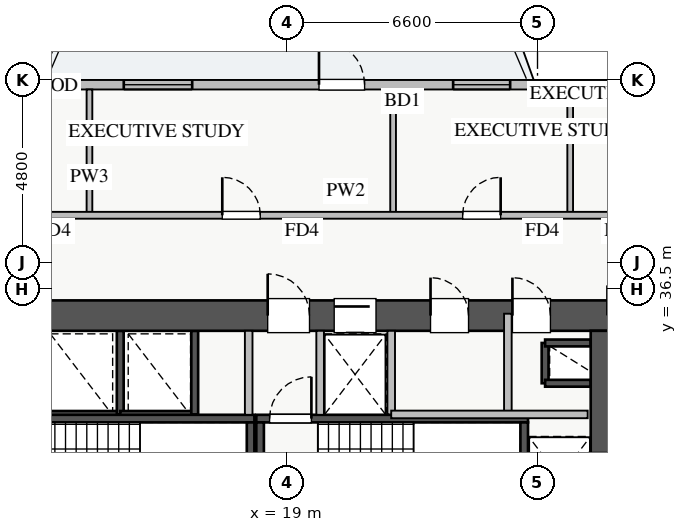
"""IFC4 building model, lengths in metres.
Left out: names, types, materials, properties, quantities, classifications, styles, units other than length and angle.
Written with IfcOpenShell. Run it as: python <this file> out.ifc"""

import sys

from ifc_helpers import new_model, si_unit, direction, frame, frame_2d, origin, place, context, subcontext, project, spatial, rectangle, extrude, source, transform, mapped, element, fill, save


model = new_model("IFC4")
c1 = context("Model", 3, precision=1e-05, world=origin(), true_north=direction((0.0, 1.0)))
c2 = subcontext(c1, "Body", "Model", "MODEL_VIEW")
j1 = project(units=[si_unit("LENGTHUNIT", "METRE"), si_unit("PLANEANGLEUNIT", "RADIAN")], contexts=[c1])
p1 = place(None, origin())
s1 = spatial("IfcSite", under=j1, at=p1, CompositionType="ELEMENT")
p2 = place(p1, origin())
s2 = spatial("IfcBuilding", under=s1, at=p2, CompositionType="ELEMENT")
p3 = place(p2, frame((0.0, 0.0, 66.5)))
s3 = spatial("IfcBuildingStorey", under=s2, at=p3, CompositionType="ELEMENT", Elevation=66.5)
p4 = place(p3, frame((12.68, 33.2, 0.0), z_axis=(0.0, 0.0, 1.0), x_axis=(1.0, 0.0, 0.0)))
e1 = element("IfcWall", 1, at=p4, inside=s3, PredefinedType="SHEAR", context=c2, shape_type="SweptSolid", body=[
    extrude(rectangle(XDim=1.94, YDim=0.18, at=frame_2d((0.97, 0.0))), origin(), (0.0, 0.0, 1.0), 3.07),
])
p5 = place(p3, frame((14.62, 33.2, 0.0), z_axis=(0.0, 0.0, 1.0), x_axis=(0.0, 1.0, 0.0)))
e2 = element("IfcWall", 2, at=p5, inside=s3, PredefinedType="SHEAR", context=c2, shape_type="SweptSolid", body=[
    extrude(rectangle(XDim=2.2, YDim=0.18, at=frame_2d((1.1, 0.0))), origin(), (0.0, 0.0, 1.0), 3.07),
])
p6 = place(p3, frame((25.8, 34.02, 0.0), z_axis=(0.0, 0.0, 1.0), x_axis=(0.0, 1.0, 0.0)))
e3 = element("IfcWall", 3, at=p6, inside=s3, PredefinedType="SHEAR", context=c2, shape_type="SweptSolid", body=[
    extrude(rectangle(XDim=1.06, YDim=0.18, at=frame_2d((0.53, 0.0))), origin(), (0.0, 0.0, 1.0), 3.07),
])
for number, where, z_axis, x_axis in (
    (4, (25.8, 35.08, 0.0), (0.0, 0.0, 1.0), (1.0, 0.0, 0.0)),
    (5, (25.8, 34.02, 0.0), (0.0, 0.0, 1.0), (1.0, 0.0, 0.0)),
):
    element("IfcWall", number, at=place(p3, frame(where, z_axis=z_axis, x_axis=x_axis)), inside=s3, PredefinedType="SHEAR", context=c2, shape_type="SweptSolid", body=[
        extrude(rectangle(XDim=1.2, YDim=0.18, at=frame_2d((0.6, 0.0))), origin(), (0.0, 0.0, 1.0), 3.07),
    ])
p7 = place(p3, frame((14.62, 33.2, 0.0), z_axis=(0.0, 0.0, 1.0), x_axis=(1.0, 0.0, 0.0)))
e6 = element("IfcWall", 6, at=p7, inside=s3, PredefinedType="SHEAR", context=c2, shape_type="SweptSolid", body=[
    extrude(rectangle(XDim=1.96, YDim=0.18, at=frame_2d((0.98, 0.0))), origin(), (0.0, 0.0, 1.0), 3.07),
])
p8 = place(p3, frame((16.58, 33.2, 0.0), z_axis=(0.0, 0.0, 1.0), x_axis=(0.0, 1.0, 0.0)))
e7 = element("IfcWall", 7, at=p8, inside=s3, PredefinedType="SHEAR", context=c2, shape_type="SweptSolid", body=[
    extrude(rectangle(XDim=2.2, YDim=0.18, at=frame_2d((1.1, 0.0))), origin(), (0.0, 0.0, 1.0), 3.07),
])
p9 = place(p3, frame((19.88, 33.2, 0.0), z_axis=(0.0, 0.0, 1.0), x_axis=(1.0, 0.0, 0.0)))
e8 = element("IfcWall", 8, at=p9, inside=s3, PredefinedType="SHEAR", context=c2, shape_type="SweptSolid", body=[
    extrude(rectangle(XDim=1.87, YDim=0.18, at=frame_2d((0.935, 0.0))), origin(), (0.0, 0.0, 1.0), 3.07),
])
p10 = place(p3, frame((11.0, 33.09, 0.0), z_axis=(0.0, 0.0, 1.0), x_axis=(1.0, 0.0, 0.0)))
e9 = element("IfcWall", 9, at=p10, inside=s3, PredefinedType="SHEAR", context=c2, shape_type="SweptSolid", body=[
    extrude(rectangle(XDim=7.15, YDim=0.2, at=frame_2d((3.575, 0.0))), origin(), (0.0, 0.0, 1.0), 3.25),
])
p11 = place(p10, frame((0.35, 0.0, 0.0)))
e10 = element("IfcOpeningElement", 10, at=p11, cuts=e9, PredefinedType="OPENING", context=c2, shape_type="SweptSolid", body=[
    extrude(rectangle(XDim=1.1, YDim=2.05, at=frame_2d((0.55, 1.025))), frame((0.0, 0.11, 0.0), z_axis=(0.0, -1.0, 0.0), x_axis=(1.0, 0.0, 0.0)), (0.0, 0.0, 1.0), 0.22),
])
p12 = place(p3, frame((18.05, 30.05, 0.0), z_axis=(0.0, 0.0, 1.0), x_axis=(0.0, 1.0, 0.0)))
e11 = element("IfcWall", 11, at=p12, inside=s3, PredefinedType="SHEAR", context=c2, shape_type="SweptSolid", body=[
    extrude(rectangle(XDim=2.94, YDim=0.2, at=frame_2d((1.47, 0.0))), origin(), (0.0, 0.0, 1.0), 3.25),
])
p13 = place(p3, frame((18.2, 33.09, 0.0), z_axis=(0.0, 0.0, 1.0), x_axis=(1.0, 0.0, 0.0)))
e12 = element("IfcWall", 12, at=p13, inside=s3, PredefinedType="SHEAR", context=c2, shape_type="SweptSolid", body=[
    extrude(rectangle(XDim=7.15, YDim=0.2, at=frame_2d((3.575, 0.0))), origin(), (0.0, 0.0, 1.0), 3.25),
])
p14 = place(p13, frame((0.35, 0.0, 0.0)))
e13 = element("IfcOpeningElement", 13, at=p14, cuts=e12, PredefinedType="OPENING", context=c2, shape_type="SweptSolid", body=[
    extrude(rectangle(XDim=1.1, YDim=2.05, at=frame_2d((0.55, 1.025))), frame((0.0, 0.11, 0.0), z_axis=(0.0, -1.0, 0.0), x_axis=(1.0, 0.0, 0.0)), (0.0, 0.0, 1.0), 0.22),
])
for number, where, z_axis, x_axis in (
    (14, (18.3, 30.05, 0.0), (0.0, 0.0, 1.0), (0.0, 1.0, 0.0)),
    (15, (25.25, 30.05, 0.0), (0.0, 0.0, 1.0), (0.0, 1.0, 0.0)),
):
    element("IfcWall", number, at=place(p3, frame(where, z_axis=z_axis, x_axis=x_axis)), inside=s3, PredefinedType="SHEAR", context=c2, shape_type="SweptSolid", body=[
        extrude(rectangle(XDim=2.94, YDim=0.2, at=frame_2d((1.47, 0.0))), origin(), (0.0, 0.0, 1.0), 3.25),
    ])
p15 = place(p3, frame((10.2, 35.8, 0.0), z_axis=(0.0, 0.0, 1.0), x_axis=(1.0, 0.0, 0.0)))
e16 = element("IfcWall", 16, at=p15, inside=s3, PredefinedType="SHEAR", context=c2, shape_type="SweptSolid", body=[
    extrude(rectangle(XDim=17.6, YDim=0.8, at=frame_2d((8.8, 0.0))), origin(), (0.0, 0.0, 1.0), 3.25),
])
p16 = place(p15, frame((1.15, 0.0, 0.0)))
e17 = element("IfcOpeningElement", 17, at=p16, cuts=e16, PredefinedType="OPENING", context=c2, shape_type="SweptSolid", body=[
    extrude(rectangle(XDim=1.1, YDim=2.05, at=frame_2d((0.55, 1.025))), frame((0.0, 0.41, 0.0), z_axis=(0.0, -1.0, 0.0), x_axis=(1.0, 0.0, 0.0)), (0.0, 0.0, 1.0), 0.82),
])
p17 = place(p15, frame((8.3, 0.0, 0.0)))
e18 = element("IfcOpeningElement", 18, at=p17, cuts=e16, PredefinedType="OPENING", context=c2, shape_type="SweptSolid", body=[
    extrude(rectangle(XDim=1.1, YDim=2.05, at=frame_2d((0.55, 1.025))), frame((0.0, 0.41, 0.0), z_axis=(0.0, -1.0, 0.0), x_axis=(1.0, 0.0, 0.0)), (0.0, 0.0, 1.0), 0.82),
])
p18 = place(p15, frame((10.05, 0.0, 0.0)))
e19 = element("IfcOpeningElement", 19, at=p18, cuts=e16, PredefinedType="OPENING", context=c2, shape_type="SweptSolid", body=[
    extrude(rectangle(XDim=1.1, YDim=2.05, at=frame_2d((0.55, 1.025))), frame((0.0, 0.41, 0.0), z_axis=(0.0, -1.0, 0.0), x_axis=(1.0, 0.0, 0.0)), (0.0, 0.0, 1.0), 0.82),
])
p19 = place(p15, frame((14.74, 0.0, 0.0)))
e20 = element("IfcOpeningElement", 20, at=p19, cuts=e16, PredefinedType="OPENING", context=c2, shape_type="SweptSolid", body=[
    extrude(rectangle(XDim=1.0, YDim=2.05, at=frame_2d((0.5, 1.025))), frame((0.0, 0.41, 0.0), z_axis=(0.0, -1.0, 0.0), x_axis=(1.0, 0.0, 0.0)), (0.0, 0.0, 1.0), 0.82),
])
p20 = place(p15, frame((12.585, 0.0, 0.0)))
e21 = element("IfcOpeningElement", 21, at=p20, cuts=e16, PredefinedType="OPENING", context=c2, shape_type="SweptSolid", body=[
    extrude(rectangle(XDim=1.0, YDim=2.05, at=frame_2d((0.5, 1.025))), frame((0.0, 0.41, 0.0), z_axis=(0.0, -1.0, 0.0), x_axis=(1.0, 0.0, 0.0)), (0.0, 0.0, 1.0), 0.82),
])
p21 = place(p3, frame((27.4, 29.8, 0.0), z_axis=(0.0, 0.0, 1.0), x_axis=(0.0, 1.0, 0.0)))
e22 = element("IfcWall", 22, at=p21, inside=s3, PredefinedType="SHEAR", context=c2, shape_type="SweptSolid", body=[
    extrude(rectangle(XDim=5.6, YDim=0.8, at=frame_2d((2.8, 0.0))), origin(), (0.0, 0.0, 1.0), 3.25),
])
p22 = place(p21, frame((1.1, 0.0, 0.0)))
e23 = element("IfcOpeningElement", 23, at=p22, cuts=e22, PredefinedType="OPENING", context=c2, shape_type="SweptSolid", body=[
    extrude(rectangle(XDim=1.3, YDim=2.05, at=frame_2d((0.65, 1.025))), frame((0.0, 0.41, 0.0), z_axis=(0.0, -1.0, 0.0), x_axis=(1.0, 0.0, 0.0)), (0.0, 0.0, 1.0), 0.82),
])
p23 = place(p3, frame((5.45, 41.875, 0.0), z_axis=(0.0, 0.0, 1.0), x_axis=(1.0, 0.0, 0.0)))
e24 = element("IfcWall", 24, at=p23, inside=s3, PredefinedType="STANDARD", context=c2, shape_type="SweptSolid", body=[
    extrude(rectangle(XDim=27.1, YDim=0.25, at=frame_2d((13.55, 0.0))), origin(), (0.0, 0.0, 1.0), 2.61),
])
p24 = place(p23, frame((14.4, 0.0, 0.0)))
e25 = element("IfcOpeningElement", 25, at=p24, cuts=e24, PredefinedType="OPENING", context=c2, shape_type="SweptSolid", body=[
    extrude(rectangle(XDim=1.2, YDim=2.1, at=frame_2d((0.6, 1.05))), frame((0.0, 0.135, 0.0), z_axis=(0.0, -1.0, 0.0), x_axis=(1.0, 0.0, 0.0)), (0.0, 0.0, 1.0), 0.27),
])
p25 = place(p23, frame((1.465, 0.0, 0.9)))
e26 = element("IfcOpeningElement", 26, at=p25, cuts=e24, PredefinedType="OPENING", context=c2, shape_type="SweptSolid", body=[
    extrude(rectangle(XDim=1.5, YDim=1.5, at=frame_2d((0.75, 0.75))), frame((0.0, 0.135, 0.0), z_axis=(0.0, -1.0, 0.0), x_axis=(1.0, 0.0, 0.0)), (0.0, 0.0, 1.0), 0.27),
])
p26 = place(p23, frame((9.263, 0.0, 0.9)))
e27 = element("IfcOpeningElement", 27, at=p26, cuts=e24, PredefinedType="OPENING", context=c2, shape_type="SweptSolid", body=[
    extrude(rectangle(XDim=1.8, YDim=1.45, at=frame_2d((0.9, 0.725))), frame((0.0, 0.135, 0.0), z_axis=(0.0, -1.0, 0.0), x_axis=(1.0, 0.0, 0.0)), (0.0, 0.0, 1.0), 0.27),
])
p27 = place(p23, frame((17.93, 0.0, 0.9)))
e28 = element("IfcOpeningElement", 28, at=p27, cuts=e24, PredefinedType="OPENING", context=c2, shape_type="SweptSolid", body=[
    extrude(rectangle(XDim=1.5, YDim=1.5, at=frame_2d((0.75, 0.75))), frame((0.0, 0.135, 0.0), z_axis=(0.0, -1.0, 0.0), x_axis=(1.0, 0.0, 0.0)), (0.0, 0.0, 1.0), 0.27),
])
p28 = place(p23, frame((22.663, 0.0, 0.9)))
e29 = element("IfcOpeningElement", 29, at=p28, cuts=e24, PredefinedType="OPENING", context=c2, shape_type="SweptSolid", body=[
    extrude(rectangle(XDim=2.1, YDim=1.48, at=frame_2d((1.05, 0.74))), frame((0.0, 0.135, 0.0), z_axis=(0.0, -1.0, 0.0), x_axis=(1.0, 0.0, 0.0)), (0.0, 0.0, 1.0), 0.27),
])
p29 = place(p23, frame((4.63, 0.0, 0.9)))
e30 = element("IfcOpeningElement", 30, at=p29, cuts=e24, PredefinedType="OPENING", context=c2, shape_type="SweptSolid", body=[
    extrude(rectangle(XDim=2.4, YDim=1.5, at=frame_2d((1.2, 0.75))), frame((0.0, 0.135, 0.0), z_axis=(0.0, -1.0, 0.0), x_axis=(1.0, 0.0, 0.0)), (0.0, 0.0, 1.0), 0.27),
])
for number, where, z_axis, x_axis in (
    (31, (18.0, 33.19, 0.0), (0.0, 0.0, 1.0), (0.0, 1.0, 0.0)),
    (32, (19.88, 33.19, 0.0), (0.0, 0.0, 1.0), (0.0, 1.0, 0.0)),
):
    element("IfcWall", number, at=place(p3, frame(where, z_axis=z_axis, x_axis=x_axis)), inside=s3, PredefinedType="PARTITIONING", context=c2, shape_type="SweptSolid", body=[
        extrude(rectangle(XDim=2.21, YDim=0.2, at=frame_2d((1.105, 0.0))), origin(), (0.0, 0.0, 1.0), 3.07),
    ])
p30 = place(p3, frame((24.82, 33.2, 0.0), z_axis=(0.0, 0.0, 1.0), x_axis=(0.0, 1.0, 0.0)))
e33 = element("IfcWall", 33, at=p30, inside=s3, PredefinedType="PARTITIONING", context=c2, shape_type="SweptSolid", body=[
    extrude(rectangle(XDim=2.65, YDim=0.2, at=frame_2d((1.325, 0.0))), origin(), (0.0, 0.0, 1.0), 3.07),
])
p31 = place(p3, frame((21.75, 33.2, 0.0), z_axis=(0.0, 0.0, 1.0), x_axis=(0.0, 1.0, 0.0)))
e34 = element("IfcWall", 34, at=p31, inside=s3, PredefinedType="PARTITIONING", context=c2, shape_type="SweptSolid", body=[
    extrude(rectangle(XDim=2.2, YDim=0.2, at=frame_2d((1.1, 0.0))), origin(), (0.0, 0.0, 1.0), 3.07),
])
p32 = place(p3, frame((21.75, 33.2, 0.0), z_axis=(0.0, 0.0, 1.0), x_axis=(1.0, 0.0, 0.0)))
e35 = element("IfcWall", 35, at=p32, inside=s3, PredefinedType="PARTITIONING", context=c2, shape_type="SweptSolid", body=[
    extrude(rectangle(XDim=5.17, YDim=0.2, at=frame_2d((2.585, 0.0))), origin(), (0.0, 0.0, 1.0), 3.07),
])
for number, where, z_axis, x_axis in (
    (36, (13.81, 38.44, 0.0), (0.0, 0.0, 1.0), (0.0, 1.0, 0.0)),
    (37, (21.8, 38.44, 0.0), (0.0, 0.0, 1.0), (0.0, 1.0, 0.0)),
    (38, (26.46, 38.44, 0.0), (0.0, 0.0, 1.0), (0.0, 1.0, 0.0)),
):
    element("IfcWall", number, at=place(p3, frame(where, z_axis=z_axis, x_axis=x_axis)), inside=s3, PredefinedType="PARTITIONING", context=c2, shape_type="SweptSolid", body=[
        extrude(rectangle(XDim=3.31, YDim=0.15, at=frame_2d((1.655, 0.0))), origin(), (0.0, 0.0, 1.0), 3.07),
    ])
p33 = place(p3, frame((8.75, 38.44, 0.0), z_axis=(0.0, 0.0, 1.0), x_axis=(1.0, 0.0, 0.0)))
e39 = element("IfcWall", 39, at=p33, inside=s3, PredefinedType="PARTITIONING", context=c2, shape_type="SweptSolid", body=[
    extrude(rectangle(XDim=23.61, YDim=0.18, at=frame_2d((11.805, 0.0))), origin(), (0.0, 0.0, 1.0), 3.07),
])
p34 = place(p33, frame((2.03, 0.0, 0.0)))
e40 = element("IfcOpeningElement", 40, at=p34, cuts=e39, PredefinedType="OPENING", context=c2, shape_type="SweptSolid", body=[
    extrude(rectangle(XDim=1.0, YDim=2.05, at=frame_2d((0.5, 1.025))), frame((0.0, 0.1, 0.0), z_axis=(0.0, -1.0, 0.0), x_axis=(1.0, 0.0, 0.0)), (0.0, 0.0, 1.0), 0.2),
])
p35 = place(p33, frame((8.555, 0.0, 0.0)))
e41 = element("IfcOpeningElement", 41, at=p35, cuts=e39, PredefinedType="OPENING", context=c2, shape_type="SweptSolid", body=[
    extrude(rectangle(XDim=1.0, YDim=2.05, at=frame_2d((0.5, 1.025))), frame((0.0, 0.1, 0.0), z_axis=(0.0, -1.0, 0.0), x_axis=(1.0, 0.0, 0.0)), (0.0, 0.0, 1.0), 0.2),
])
p36 = place(p33, frame((14.88, 0.0, 0.0)))
e42 = element("IfcOpeningElement", 42, at=p36, cuts=e39, PredefinedType="OPENING", context=c2, shape_type="SweptSolid", body=[
    extrude(rectangle(XDim=1.0, YDim=2.05, at=frame_2d((0.5, 1.025))), frame((0.0, 0.1, 0.0), z_axis=(0.0, -1.0, 0.0), x_axis=(1.0, 0.0, 0.0)), (0.0, 0.0, 1.0), 0.2),
])
p37 = place(p33, frame((20.16, 0.0, 0.0)))
e43 = element("IfcOpeningElement", 43, at=p37, cuts=e39, PredefinedType="OPENING", context=c2, shape_type="SweptSolid", body=[
    extrude(rectangle(XDim=1.0, YDim=2.05, at=frame_2d((0.5, 1.025))), frame((0.0, 0.1, 0.0), z_axis=(0.0, -1.0, 0.0), x_axis=(1.0, 0.0, 0.0)), (0.0, 0.0, 1.0), 0.2),
])
m1 = source(origin(), c2, "Body", "SweptSolid", [
    extrude(rectangle(XDim=1.2, YDim=2.1, at=frame_2d((0.6, 1.05))), frame((0.0, 0.025, 0.0), z_axis=(0.0, -1.0, 0.0), x_axis=(1.0, 0.0, 0.0)), (0.0, 0.0, 1.0), 0.05),
])
p38 = place(p24, origin())
e44 = element("IfcDoor", 44, at=p38, inside=s3, OperationType="SINGLE_SWING_LEFT", PredefinedType="DOOR", context=c2, shape_type="MappedRepresentation", body=[
    mapped(m1, transform((0.0, 0.0, 0.0), x_axis=(1.0, 0.0, 0.0), y_axis=(0.0, 1.0, 0.0), z_axis=(0.0, 0.0, 1.0), scale=1.0)),
])
fill(e25, e44)
m2 = source(origin(), c2, "Body", "SweptSolid", [
    extrude(rectangle(XDim=1.8, YDim=1.45, at=frame_2d((0.9, 0.725))), frame((0.0, 0.03, 0.0), z_axis=(0.0, -1.0, 0.0), x_axis=(1.0, 0.0, 0.0)), (0.0, 0.0, 1.0), 0.06),
])
p39 = place(p26, origin())
e45 = element("IfcWindow", 45, at=p39, inside=s3, PartitioningType="DOUBLE_PANEL_VERTICAL", PredefinedType="WINDOW", context=c2, shape_type="MappedRepresentation", body=[
    mapped(m2, transform((0.0, 0.0, 0.0), x_axis=(1.0, 0.0, 0.0), y_axis=(0.0, 1.0, 0.0), z_axis=(0.0, 0.0, 1.0), scale=1.0)),
])
fill(e27, e45)
m3 = source(origin(), c2, "Body", "SweptSolid", [
    extrude(rectangle(XDim=1.5, YDim=1.5, at=frame_2d((0.75, 0.75))), frame((0.0, 0.03, 0.0), z_axis=(0.0, -1.0, 0.0), x_axis=(1.0, 0.0, 0.0)), (0.0, 0.0, 1.0), 0.06),
])
p40 = place(p27, origin())
e46 = element("IfcWindow", 46, at=p40, inside=s3, PartitioningType="DOUBLE_PANEL_VERTICAL", PredefinedType="WINDOW", context=c2, shape_type="MappedRepresentation", body=[
    mapped(m3, transform((0.0, 0.0, 0.0), x_axis=(1.0, 0.0, 0.0), y_axis=(0.0, 1.0, 0.0), z_axis=(0.0, 0.0, 1.0), scale=1.0)),
])
fill(e28, e46)
m4 = source(origin(), c2, "Body", "SweptSolid", [
    extrude(rectangle(XDim=1.3, YDim=2.05, at=frame_2d((0.65, 1.025))), frame((0.0, 0.025, 0.0), z_axis=(0.0, -1.0, 0.0), x_axis=(1.0, 0.0, 0.0)), (0.0, 0.0, 1.0), 0.05),
])
p41 = place(p22, origin())
e47 = element("IfcDoor", 47, at=p41, inside=s3, OperationType="SLIDING_TO_LEFT", PredefinedType="DOOR", context=c2, shape_type="MappedRepresentation", body=[
    mapped(m4, transform((0.0, 0.0, 0.0), x_axis=(1.0, 0.0, 0.0), y_axis=(0.0, 1.0, 0.0), z_axis=(0.0, 0.0, 1.0), scale=1.0)),
])
fill(e23, e47)
m5 = source(origin(), c2, "Body", "SweptSolid", [
    extrude(rectangle(XDim=1.1, YDim=2.05, at=frame_2d((0.55, 1.025))), frame((0.0, 0.025, 0.0), z_axis=(0.0, -1.0, 0.0), x_axis=(1.0, 0.0, 0.0)), (0.0, 0.0, 1.0), 0.05),
])
p42 = place(p17, origin())
e48 = element("IfcDoor", 48, at=p42, inside=s3, OperationType="SINGLE_SWING_LEFT", PredefinedType="DOOR", context=c2, shape_type="MappedRepresentation", body=[
    mapped(m5, transform((0.0, 0.0, 0.0), x_axis=(1.0, 0.0, 0.0), y_axis=(0.0, 1.0, 0.0), z_axis=(0.0, 0.0, 1.0), scale=1.0)),
])
fill(e18, e48)
p43 = place(p14, origin())
e49 = element("IfcDoor", 49, at=p43, inside=s3, OperationType="SINGLE_SWING_RIGHT", PredefinedType="DOOR", context=c2, shape_type="MappedRepresentation", body=[
    mapped(m5, transform((0.0, 0.0, 0.0), x_axis=(1.0, 0.0, 0.0), y_axis=(0.0, 1.0, 0.0), z_axis=(0.0, 0.0, 1.0), scale=1.0)),
])
fill(e13, e49)
p44 = place(p18, origin())
e50 = element("IfcDoor", 50, at=p44, inside=s3, OperationType="SLIDING_TO_LEFT", PredefinedType="DOOR", context=c2, shape_type="MappedRepresentation", body=[
    mapped(m5, transform((0.0, 0.0, 0.0), x_axis=(1.0, 0.0, 0.0), y_axis=(0.0, 1.0, 0.0), z_axis=(0.0, 0.0, 1.0), scale=1.0)),
])
fill(e19, e50)
m6 = source(origin(), c2, "Body", "SweptSolid", [
    extrude(rectangle(XDim=1.0, YDim=2.05, at=frame_2d((0.5, 1.025))), frame((0.0, 0.025, 0.0), z_axis=(0.0, -1.0, 0.0), x_axis=(1.0, 0.0, 0.0)), (0.0, 0.0, 1.0), 0.05),
])
p45 = place(p19, origin())
e51 = element("IfcDoor", 51, at=p45, inside=s3, OperationType="SINGLE_SWING_LEFT", PredefinedType="DOOR", context=c2, shape_type="MappedRepresentation", body=[
    mapped(m6, transform((0.0, 0.0, 0.0), x_axis=(1.0, 0.0, 0.0), y_axis=(0.0, 1.0, 0.0), z_axis=(0.0, 0.0, 1.0), scale=1.0)),
])
fill(e20, e51)
p46 = place(p20, origin())
e52 = element("IfcDoor", 52, at=p46, inside=s3, OperationType="SINGLE_SWING_LEFT", PredefinedType="DOOR", context=c2, shape_type="MappedRepresentation", body=[
    mapped(m6, transform((0.0, 0.0, 0.0), x_axis=(1.0, 0.0, 0.0), y_axis=(0.0, 1.0, 0.0), z_axis=(0.0, 0.0, 1.0), scale=1.0)),
])
fill(e21, e52)
p47 = place(p35, origin())
e53 = element("IfcDoor", 53, at=p47, inside=s3, OperationType="SINGLE_SWING_LEFT", PredefinedType="DOOR", context=c2, shape_type="MappedRepresentation", body=[
    mapped(m6, transform((0.0, 0.0, 0.0), x_axis=(1.0, 0.0, 0.0), y_axis=(0.0, 1.0, 0.0), z_axis=(0.0, 0.0, 1.0), scale=1.0)),
])
fill(e41, e53)
p48 = place(p36, origin())
e54 = element("IfcDoor", 54, at=p48, inside=s3, OperationType="SINGLE_SWING_RIGHT", PredefinedType="DOOR", context=c2, shape_type="MappedRepresentation", body=[
    mapped(m6, transform((0.0, 0.0, 0.0), x_axis=(1.0, 0.0, 0.0), y_axis=(0.0, 1.0, 0.0), z_axis=(0.0, 0.0, 1.0), scale=1.0)),
])
fill(e42, e54)
save(model, sys.argv[1])
